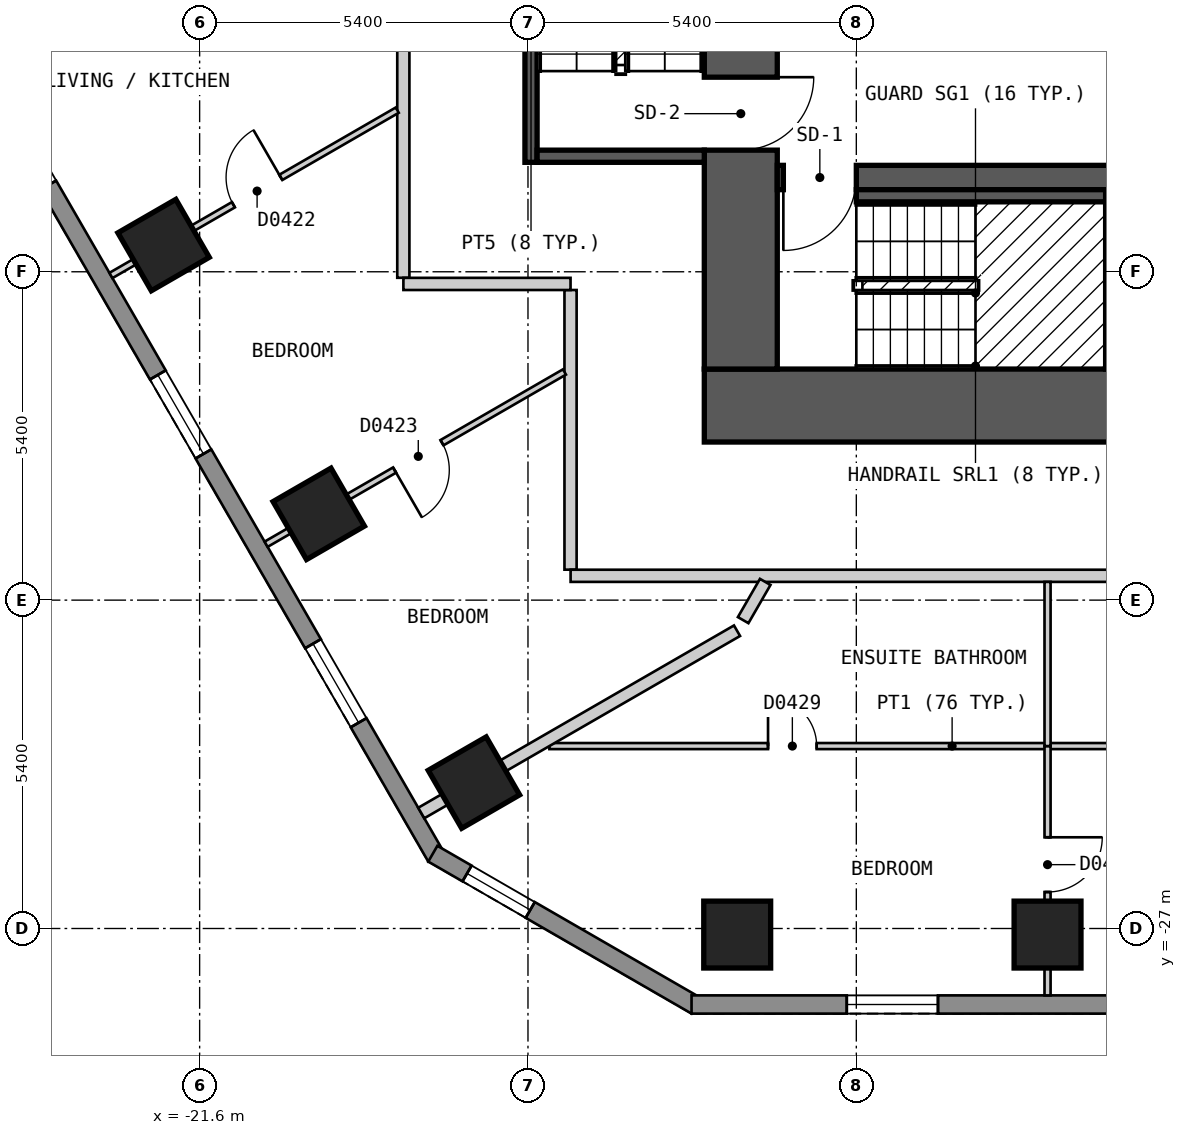
"""IFC4 building model, lengths in metres.
Left out: names, types, materials, properties, quantities, classifications, styles, units other than length and angle.
Written with IfcOpenShell. Run it as: python <this file> out.ifc"""

import sys

from ifc_helpers import new_model, si_unit, direction, frame, frame_2d, origin, origin_2d, place, context, subcontext, project, spatial, polyline, rectangle, outline, extrude, element, fill, save


model = new_model("IFC4")
c1 = context("Model", 3, precision=1e-05, world=origin(), true_north=direction((0.0, 1.0)))
c2 = subcontext(c1, "Body", "Model", "MODEL_VIEW")
j1 = project(units=[si_unit("LENGTHUNIT", "METRE"), si_unit("PLANEANGLEUNIT", "RADIAN")], contexts=[c1])
p1 = place(None, origin())
s1 = spatial("IfcSite", under=j1, at=p1, CompositionType="ELEMENT")
p2 = place(p1, origin())
s2 = spatial("IfcBuilding", under=s1, at=p2, CompositionType="ELEMENT")
p3 = place(p2, frame((0.0, 0.0, 26.4)))
s3 = spatial("IfcBuildingStorey", under=s2, at=p3, CompositionType="ELEMENT", Elevation=26.4)
for number, where, z_axis, x_axis in (
    (1, (-22.193, -15.761, 0.0), (0.0, 0.0, 1.0), (0.5, -0.866, 0.0)),
    (2, (-19.641, -20.181, 0.0), (0.0, 0.0, 1.0), (0.5, -0.866, 0.0)),
    (3, (-17.089, -24.601, 0.0), (0.0, 0.0, 1.0), (0.5, -0.866, 0.0)),
    (4, (-12.759, -27.1, 0.0), (0.0, 0.0, 1.0), (1.0, 0.0, 0.0)),
    (5, (-7.655, -27.1, 0.0), (0.0, 0.0, 1.0), (1.0, 0.0, 0.0)),
):
    element("IfcColumn", number, at=place(p3, frame(where, z_axis=z_axis, x_axis=x_axis)), inside=s3, PredefinedType="COLUMN", context=c2, shape_type="SweptSolid", body=[
        extrude(rectangle(XDim=1.1, YDim=1.1, at=origin_2d()), origin(), (0.0, 0.0, 1.0), 3.0),
    ])
p4 = place(p3, frame((-13.3, -18.4, 0.0), z_axis=(0.0, 0.0, 1.0), x_axis=(1.0, 0.0, 0.0)))
e6 = element("IfcWall", 6, at=p4, inside=s3, PredefinedType="SHEAR", context=c2, shape_type="SweptSolid", body=[
    extrude(rectangle(XDim=26.6, YDim=1.2, at=frame_2d((13.3, 0.0))), origin(), (0.0, 0.0, 1.0), 2.7),
])
p5 = place(p3, frame((-12.7, -17.8, 0.0), z_axis=(0.0, 0.0, 1.0), x_axis=(0.0, 1.0, 0.0)))
e7 = element("IfcWall", 7, at=p5, inside=s3, PredefinedType="SHEAR", context=c2, shape_type="SweptSolid", body=[
    extrude(rectangle(XDim=11.6, YDim=1.2, at=frame_2d((5.8, 0.0))), origin(), (0.0, 0.0, 1.0), 2.7),
])
p6 = place(p5, frame((3.6, 0.0, 0.0)))
e8 = element("IfcOpeningElement", 8, at=p6, cuts=e7, PredefinedType="OPENING", context=c2, shape_type="SweptSolid", body=[
    extrude(rectangle(XDim=1.2, YDim=2.1, at=frame_2d((0.6, 1.05))), frame((0.0, 0.61, 0.0), z_axis=(0.0, -1.0, 0.0), x_axis=(1.0, 0.0, 0.0)), (0.0, 0.0, 1.0), 1.22),
])
p7 = place(p3, frame((-12.1, -14.65, 0.0), z_axis=(0.0, 0.0, 1.0), x_axis=(1.0, 0.0, 0.0)))
e9 = element("IfcWall", 9, at=p7, inside=s3, PredefinedType="SHEAR", context=c2, shape_type="SweptSolid", body=[
    extrude(rectangle(XDim=24.2, YDim=0.4, at=frame_2d((12.1, 0.0))), origin(), (0.0, 0.0, 1.0), 2.7),
])
p8 = place(p7, frame((1.3, 0.0, 0.0), z_axis=(0.0, 0.0, 1.0), x_axis=(-1.0, 0.0, 0.0)))
e10 = element("IfcOpeningElement", 10, at=p8, cuts=e9, PredefinedType="OPENING", context=c2, shape_type="SweptSolid", body=[
    extrude(rectangle(XDim=1.2, YDim=2.1, at=frame_2d((0.6, 1.05))), frame((0.0, 0.21, 0.0), z_axis=(0.0, -1.0, 0.0), x_axis=(1.0, 0.0, 0.0)), (0.0, 0.0, 1.0), 0.42),
])
p9 = place(p7, frame((24.15, 0.0, 0.0), z_axis=(0.0, 0.0, 1.0), x_axis=(-1.0, 0.0, 0.0)))
e11 = element("IfcOpeningElement", 11, at=p9, cuts=e9, PredefinedType="OPENING", context=c2, shape_type="SweptSolid", body=[
    extrude(rectangle(XDim=1.2, YDim=2.1, at=frame_2d((0.6, 1.05))), frame((0.0, 0.21, 0.0), z_axis=(0.0, -1.0, 0.0), x_axis=(1.0, 0.0, 0.0)), (0.0, 0.0, 1.0), 0.42),
])
p10 = place(p7, frame((16.25, 0.0, 0.0), z_axis=(0.0, 0.0, 1.0), x_axis=(-1.0, 0.0, 0.0)))
e12 = element("IfcOpeningElement", 12, at=p10, cuts=e9, PredefinedType="OPENING", context=c2, shape_type="SweptSolid", body=[
    extrude(rectangle(XDim=0.9, YDim=2.1, at=frame_2d((0.45, 1.05))), frame((0.0, 0.21, 0.0), z_axis=(0.0, -1.0, 0.0), x_axis=(1.0, 0.0, 0.0)), (0.0, 0.0, 1.0), 0.42),
])
p11 = place(p7, frame((18.05, 0.0, 0.0), z_axis=(0.0, 0.0, 1.0), x_axis=(-1.0, 0.0, 0.0)))
e13 = element("IfcOpeningElement", 13, at=p11, cuts=e9, PredefinedType="OPENING", context=c2, shape_type="SweptSolid", body=[
    extrude(rectangle(XDim=0.9, YDim=2.1, at=frame_2d((0.45, 1.05))), frame((0.0, 0.21, 0.0), z_axis=(0.0, -1.0, 0.0), x_axis=(1.0, 0.0, 0.0)), (0.0, 0.0, 1.0), 0.42),
])
p12 = place(p3, frame((-31.22, -2.425, 0.0), z_axis=(0.0, 0.0, 1.0), x_axis=(0.500001938803, -0.866024284413, 0.0)))
e14 = element("IfcWall", 14, at=p12, inside=s3, PredefinedType="SOLIDWALL", context=c2, shape_type="SweptSolid", body=[
    extrude(outline(polyline([(0.0, -0.15), (27.02, -0.15), (26.94, 0.15), (0.08, 0.15), (0.0, -0.15)])), origin(), (0.0, 0.0, 1.0), 2.7),
])
p13 = place(p12, frame((2.553, 0.0, 0.15)))
e15 = element("IfcOpeningElement", 15, at=p13, cuts=e14, PredefinedType="OPENING", context=c2, shape_type="SweptSolid", body=[
    extrude(rectangle(XDim=1.5, YDim=2.1, at=frame_2d((0.75, 1.05))), frame((0.0, 0.16, 0.0), z_axis=(0.0, -1.0, 0.0), x_axis=(1.0, 0.0, 0.0)), (0.0, 0.0, 1.0), 0.32),
])
p14 = place(p12, frame((7.657, 0.0, 0.15)))
e16 = element("IfcOpeningElement", 16, at=p14, cuts=e14, PredefinedType="OPENING", context=c2, shape_type="SweptSolid", body=[
    extrude(rectangle(XDim=1.5, YDim=2.1, at=frame_2d((0.75, 1.05))), frame((0.0, 0.16, 0.0), z_axis=(0.0, -1.0, 0.0), x_axis=(1.0, 0.0, 0.0)), (0.0, 0.0, 1.0), 0.32),
])
p15 = place(p12, frame((12.761, 0.0, 0.15)))
e17 = element("IfcOpeningElement", 17, at=p15, cuts=e14, PredefinedType="OPENING", context=c2, shape_type="SweptSolid", body=[
    extrude(rectangle(XDim=1.5, YDim=2.1, at=frame_2d((0.75, 1.05))), frame((0.0, 0.16, 0.0), z_axis=(0.0, -1.0, 0.0), x_axis=(1.0, 0.0, 0.0)), (0.0, 0.0, 1.0), 0.32),
])
p16 = place(p12, frame((17.865, 0.0, 0.15)))
e18 = element("IfcOpeningElement", 18, at=p16, cuts=e14, PredefinedType="OPENING", context=c2, shape_type="SweptSolid", body=[
    extrude(rectangle(XDim=1.5, YDim=2.1, at=frame_2d((0.75, 1.05))), frame((0.0, 0.16, 0.0), z_axis=(0.0, -1.0, 0.0), x_axis=(1.0, 0.0, 0.0)), (0.0, 0.0, 1.0), 0.32),
])
p17 = place(p12, frame((22.969, 0.0, 0.15)))
e19 = element("IfcOpeningElement", 19, at=p17, cuts=e14, PredefinedType="OPENING", context=c2, shape_type="SweptSolid", body=[
    extrude(rectangle(XDim=1.5, YDim=2.1, at=frame_2d((0.75, 1.05))), frame((0.0, 0.16, 0.0), z_axis=(0.0, -1.0, 0.0), x_axis=(1.0, 0.0, 0.0)), (0.0, 0.0, 1.0), 0.32),
])
p18 = place(p3, frame((-17.765, -25.77, 0.0), z_axis=(0.0, 0.0, 1.0), x_axis=(0.866010750942, -0.50002537861, 0.0)))
e20 = element("IfcWall", 20, at=p18, inside=s3, PredefinedType="SOLIDWALL", context=c2, shape_type="SweptSolid", body=[
    extrude(outline(polyline([(0.0, -0.15), (5.0, -0.15), (4.919, 0.15), (0.08, 0.15), (0.0, -0.15)])), origin(), (0.0, 0.0, 1.0), 2.7),
])
p19 = place(p18, frame((0.65, 0.0, 0.15)))
e21 = element("IfcOpeningElement", 21, at=p19, cuts=e20, PredefinedType="OPENING", context=c2, shape_type="SweptSolid", body=[
    extrude(rectangle(XDim=1.2, YDim=2.1, at=frame_2d((0.6, 1.05))), frame((0.0, 0.16, 0.0), z_axis=(0.0, -1.0, 0.0), x_axis=(1.0, 0.0, 0.0)), (0.0, 0.0, 1.0), 0.32),
])
p20 = place(p3, frame((-13.51, -28.25, 0.0), z_axis=(0.0, 0.0, 1.0), x_axis=(1.0, 0.0, 0.0)))
e22 = element("IfcWall", 22, at=p20, inside=s3, PredefinedType="SOLIDWALL", context=c2, shape_type="SweptSolid", body=[
    extrude(outline(polyline([(0.0, -0.15), (27.02, -0.15), (26.94, 0.15), (0.08, 0.15), (0.0, -0.15)])), origin(), (0.0, 0.0, 1.0), 2.7),
])
p21 = place(p20, frame((2.553, 0.0, 0.15)))
e23 = element("IfcOpeningElement", 23, at=p21, cuts=e22, PredefinedType="OPENING", context=c2, shape_type="SweptSolid", body=[
    extrude(rectangle(XDim=1.5, YDim=2.1, at=frame_2d((0.75, 1.05))), frame((0.0, 0.16, 0.0), z_axis=(0.0, -1.0, 0.0), x_axis=(1.0, 0.0, 0.0)), (0.0, 0.0, 1.0), 0.32),
])
p22 = place(p20, frame((7.657, 0.0, 0.15)))
e24 = element("IfcOpeningElement", 24, at=p22, cuts=e22, PredefinedType="OPENING", context=c2, shape_type="SweptSolid", body=[
    extrude(rectangle(XDim=1.5, YDim=2.1, at=frame_2d((0.75, 1.05))), frame((0.0, 0.16, 0.0), z_axis=(0.0, -1.0, 0.0), x_axis=(1.0, 0.0, 0.0)), (0.0, 0.0, 1.0), 0.32),
])
p23 = place(p20, frame((12.761, 0.0, 0.15)))
e25 = element("IfcOpeningElement", 25, at=p23, cuts=e22, PredefinedType="OPENING", context=c2, shape_type="SweptSolid", body=[
    extrude(rectangle(XDim=1.5, YDim=2.1, at=frame_2d((0.75, 1.05))), frame((0.0, 0.16, 0.0), z_axis=(0.0, -1.0, 0.0), x_axis=(1.0, 0.0, 0.0)), (0.0, 0.0, 1.0), 0.32),
])
p24 = place(p20, frame((17.865, 0.0, 0.15)))
e26 = element("IfcOpeningElement", 26, at=p24, cuts=e22, PredefinedType="OPENING", context=c2, shape_type="SweptSolid", body=[
    extrude(rectangle(XDim=1.5, YDim=2.1, at=frame_2d((0.75, 1.05))), frame((0.0, 0.16, 0.0), z_axis=(0.0, -1.0, 0.0), x_axis=(1.0, 0.0, 0.0)), (0.0, 0.0, 1.0), 0.32),
])
p25 = place(p20, frame((22.969, 0.0, 0.15)))
e27 = element("IfcOpeningElement", 27, at=p25, cuts=e22, PredefinedType="OPENING", context=c2, shape_type="SweptSolid", body=[
    extrude(rectangle(XDim=1.5, YDim=2.1, at=frame_2d((0.75, 1.05))), frame((0.0, 0.16, 0.0), z_axis=(0.0, -1.0, 0.0), x_axis=(1.0, 0.0, 0.0)), (0.0, 0.0, 1.0), 0.32),
])
p26 = place(p3, frame((-15.5, -16.5, 0.0), z_axis=(0.0, 0.0, 1.0), x_axis=(0.0, -1.0, 0.0)))
e28 = element("IfcWall", 28, at=p26, inside=s3, PredefinedType="PARTITIONING", context=c2, shape_type="SweptSolid", body=[
    extrude(rectangle(XDim=4.599, YDim=0.2, at=frame_2d((2.3, 0.0))), origin(), (0.0, 0.0, 1.0), 2.7),
])
p27 = place(p3, frame((-18.25, -11.507, 0.0), z_axis=(0.0, 0.0, 1.0), x_axis=(0.0, -1.0, 0.0)))
e29 = element("IfcWall", 29, at=p27, inside=s3, PredefinedType="PARTITIONING", context=c2, shape_type="SweptSolid", body=[
    extrude(rectangle(XDim=4.792, YDim=0.2, at=frame_2d((2.396, 0.0))), origin(), (0.0, 0.0, 1.0), 2.7),
])
p28 = place(p3, frame((-18.249, -16.4, 0.0), z_axis=(0.0, 0.0, 1.0), x_axis=(1.0, 0.0, 0.0)))
e30 = element("IfcWall", 30, at=p28, inside=s3, PredefinedType="PARTITIONING", context=c2, shape_type="SweptSolid", body=[
    extrude(rectangle(XDim=2.749, YDim=0.2, at=frame_2d((1.375, 0.0))), origin(), (0.0, 0.0, 1.0), 2.7),
])
p29 = place(p3, frame((-15.499, -21.2, 0.0), z_axis=(0.0, 0.0, 1.0), x_axis=(1.0, 0.0, 0.0)))
e31 = element("IfcWall", 31, at=p29, inside=s3, PredefinedType="PARTITIONING", context=c2, shape_type="SweptSolid", body=[
    extrude(rectangle(XDim=30.898, YDim=0.2, at=frame_2d((15.449, 0.0))), origin(), (0.0, 0.0, 1.0), 2.7),
])
p30 = place(p29, frame((15.0, 0.0, 0.0)))
e32 = element("IfcOpeningElement", 32, at=p30, cuts=e31, PredefinedType="OPENING", context=c2, shape_type="SweptSolid", body=[
    extrude(rectangle(XDim=1.0, YDim=2.1, at=frame_2d((0.5, 1.05))), frame((0.0, 0.11, 0.0), z_axis=(0.0, -1.0, 0.0), x_axis=(1.0, 0.0, 0.0)), (0.0, 0.0, 1.0), 0.22),
])
p31 = place(p29, frame((20.104, 0.0, 0.0)))
e33 = element("IfcOpeningElement", 33, at=p31, cuts=e31, PredefinedType="OPENING", context=c2, shape_type="SweptSolid", body=[
    extrude(rectangle(XDim=1.0, YDim=2.1, at=frame_2d((0.5, 1.05))), frame((0.0, 0.11, 0.0), z_axis=(0.0, -1.0, 0.0), x_axis=(1.0, 0.0, 0.0)), (0.0, 0.0, 1.0), 0.22),
])
p32 = place(p3, frame((-15.848, -24.0, 0.0), z_axis=(0.0, 0.0, 1.0), x_axis=(1.0, 0.0, 0.0)))
e34 = element("IfcWall", 34, at=p32, inside=s3, PredefinedType="PARTITIONING", context=c2, shape_type="SweptSolid", body=[
    extrude(rectangle(XDim=13.247, YDim=0.1, at=frame_2d((6.624, 0.0))), origin(), (0.0, 0.0, 1.0), 2.7),
])
p33 = place(p32, frame((3.596, 0.0, 0.0)))
e35 = element("IfcOpeningElement", 35, at=p33, cuts=e34, PredefinedType="OPENING", context=c2, shape_type="SweptSolid", body=[
    extrude(rectangle(XDim=0.8, YDim=2.1, at=frame_2d((0.4, 1.05))), frame((0.0, 0.06, 0.0), z_axis=(0.0, -1.0, 0.0), x_axis=(1.0, 0.0, 0.0)), (0.0, 0.0, 1.0), 0.12),
])
p34 = place(p32, frame((10.345, 0.0, 0.0)))
e36 = element("IfcOpeningElement", 36, at=p34, cuts=e34, PredefinedType="OPENING", context=c2, shape_type="SweptSolid", body=[
    extrude(rectangle(XDim=0.8, YDim=2.1, at=frame_2d((0.4, 1.05))), frame((0.0, 0.06, 0.0), z_axis=(0.0, -1.0, 0.0), x_axis=(1.0, 0.0, 0.0)), (0.0, 0.0, 1.0), 0.12),
])
p35 = place(p3, frame((-7.655, -28.1, 0.0), z_axis=(0.0, 0.0, 1.0), x_axis=(0.0, 1.0, 0.0)))
e37 = element("IfcWall", 37, at=p35, inside=s3, PredefinedType="PARTITIONING", context=c2, shape_type="SweptSolid", body=[
    extrude(rectangle(XDim=4.1, YDim=0.1, at=frame_2d((2.05, 0.0))), origin(), (0.0, 0.0, 1.0), 2.7),
])
p36 = place(p35, frame((1.7, 0.0, 0.0)))
e38 = element("IfcOpeningElement", 38, at=p36, cuts=e37, PredefinedType="OPENING", context=c2, shape_type="SweptSolid", body=[
    extrude(rectangle(XDim=0.9, YDim=2.1, at=frame_2d((0.45, 1.05))), frame((0.0, 0.06, 0.0), z_axis=(0.0, -1.0, 0.0), x_axis=(1.0, 0.0, 0.0)), (0.0, 0.0, 1.0), 0.12),
])
p37 = place(p3, frame((-20.507, -20.681, 0.0), z_axis=(0.0, 0.0, 1.0), x_axis=(0.866028446103, 0.499994730513, 0.0)))
e39 = element("IfcWall", 39, at=p37, inside=s3, PredefinedType="PARTITIONING", context=c2, shape_type="SweptSolid", body=[
    extrude(rectangle(XDim=5.666, YDim=0.1, at=frame_2d((2.833, 0.0))), origin(), (0.0, 0.0, 1.0), 2.7),
])
p38 = place(p37, frame((2.44, 0.0, 0.0)))
e40 = element("IfcOpeningElement", 40, at=p38, cuts=e39, PredefinedType="OPENING", context=c2, shape_type="SweptSolid", body=[
    extrude(rectangle(XDim=0.9, YDim=2.1, at=frame_2d((0.45, 1.05))), frame((0.0, 0.06, 0.0), z_axis=(0.0, -1.0, 0.0), x_axis=(1.0, 0.0, 0.0)), (0.0, 0.0, 1.0), 0.12),
])
p39 = place(p3, frame((-23.059, -16.261, 0.0), z_axis=(0.0, 0.0, 1.0), x_axis=(0.866004639177, 0.500035963631, 0.0)))
e41 = element("IfcWall", 41, at=p39, inside=s3, PredefinedType="PARTITIONING", context=c2, shape_type="SweptSolid", body=[
    extrude(rectangle(XDim=5.438, YDim=0.1, at=frame_2d((2.719, 0.0))), origin(), (0.0, 0.0, 1.0), 2.7),
])
p40 = place(p39, frame((2.326, 0.0, 0.0)))
e42 = element("IfcOpeningElement", 42, at=p40, cuts=e41, PredefinedType="OPENING", context=c2, shape_type="SweptSolid", body=[
    extrude(rectangle(XDim=0.9, YDim=2.1, at=frame_2d((0.45, 1.05))), frame((0.0, 0.06, 0.0), z_axis=(0.0, -1.0, 0.0), x_axis=(1.0, 0.0, 0.0)), (0.0, 0.0, 1.0), 0.12),
])
p41 = place(p3, frame((-12.661, -21.929, 0.0), z_axis=(0.0, 0.0, 1.0), x_axis=(0.499683639304, 0.866207977689, 0.0)))
e43 = element("IfcWall", 43, at=p41, inside=s3, PredefinedType="PARTITIONING", context=c2, shape_type="SweptSolid", body=[
    extrude(rectangle(XDim=0.726, YDim=0.2, at=frame_2d((0.363, 0.0))), origin(), (0.0, 0.0, 1.0), 2.7),
])
p42 = place(p3, frame((-17.955, -25.101, 0.0), z_axis=(0.0, 0.0, 1.0), x_axis=(0.866039817231, 0.499975034347, 0.0)))
e44 = element("IfcWall", 44, at=p42, inside=s3, PredefinedType="PARTITIONING", context=c2, shape_type="SweptSolid", body=[
    extrude(rectangle(XDim=5.996, YDim=0.2, at=frame_2d((2.998, 0.0))), origin(), (0.0, 0.0, 1.0), 2.7),
])
p43 = place(p3, frame((-7.655, -24.0, 0.0), z_axis=(0.0, 0.0, 1.0), x_axis=(0.0, 1.0, 0.0)))
e45 = element("IfcWall", 45, at=p43, inside=s3, PredefinedType="PARTITIONING", context=c2, shape_type="SweptSolid", body=[
    extrude(rectangle(XDim=2.7, YDim=0.1, at=frame_2d((1.35, 0.0))), origin(), (0.0, 0.0, 1.0), 2.7),
])
p44 = place(p3, frame((-16.15, -14.4, 0.0), z_axis=(0.0, 0.0, 1.0), x_axis=(0.0, 1.0, 0.0)))
e46 = element("IfcWall", 46, at=p44, inside=s3, PredefinedType="SOLIDWALL", context=c2, shape_type="SweptSolid", body=[
    extrude(rectangle(XDim=5.8, YDim=0.2, at=frame_2d((2.9, 0.0))), origin(), (0.0, 0.0, 1.0), 2.7),
])
p45 = place(p3, frame((-16.05, -14.3, 0.0), z_axis=(0.0, 0.0, 1.0), x_axis=(1.0, 0.0, 0.0)))
e47 = element("IfcWall", 47, at=p45, inside=s3, PredefinedType="SOLIDWALL", context=c2, shape_type="SweptSolid", body=[
    extrude(rectangle(XDim=2.75, YDim=0.2, at=frame_2d((1.375, 0.0))), origin(), (0.0, 0.0, 1.0), 2.7),
])
p46 = place(p3, frame((-10.8, -14.95, 0.0), z_axis=(0.0, 0.0, 1.0), x_axis=(1.0, 0.0, 0.0)))
e48 = element("IfcWall", 48, at=p46, inside=s3, PredefinedType="SOLIDWALL", context=c2, shape_type="SweptSolid", body=[
    extrude(rectangle(XDim=4.1, YDim=0.2, at=frame_2d((2.05, 0.0))), origin(), (0.0, 0.0, 1.0), 2.7),
])
p47 = place(p16, origin())
e49 = element("IfcWindow", 49, at=p47, inside=s3, PartitioningType="SINGLE_PANEL", PredefinedType="WINDOW", context=c2, shape_type="SweptSolid", body=[
    extrude(rectangle(XDim=1.5, YDim=2.1, at=frame_2d((0.75, 1.05))), frame((0.0, 0.03, 0.0), z_axis=(0.0, -1.0, 0.0), x_axis=(1.0, 0.0, 0.0)), (0.0, 0.0, 1.0), 0.06),
])
fill(e18, e49)
p48 = place(p17, origin())
e50 = element("IfcWindow", 50, at=p48, inside=s3, PartitioningType="SINGLE_PANEL", PredefinedType="WINDOW", context=c2, shape_type="SweptSolid", body=[
    extrude(rectangle(XDim=1.5, YDim=2.1, at=frame_2d((0.75, 1.05))), frame((0.0, 0.03, 0.0), z_axis=(0.0, -1.0, 0.0), x_axis=(1.0, 0.0, 0.0)), (0.0, 0.0, 1.0), 0.06),
])
fill(e19, e50)
p49 = place(p19, origin())
e51 = element("IfcWindow", 51, at=p49, inside=s3, PartitioningType="SINGLE_PANEL", PredefinedType="WINDOW", context=c2, shape_type="SweptSolid", body=[
    extrude(rectangle(XDim=1.2, YDim=2.1, at=frame_2d((0.6, 1.05))), frame((0.0, 0.03, 0.0), z_axis=(0.0, -1.0, 0.0), x_axis=(1.0, 0.0, 0.0)), (0.0, 0.0, 1.0), 0.06),
])
fill(e21, e51)
p50 = place(p21, origin())
e52 = element("IfcWindow", 52, at=p50, inside=s3, PartitioningType="SINGLE_PANEL", PredefinedType="WINDOW", context=c2, shape_type="SweptSolid", body=[
    extrude(rectangle(XDim=1.5, YDim=2.1, at=frame_2d((0.75, 1.05))), frame((0.0, 0.03, 0.0), z_axis=(0.0, -1.0, 0.0), x_axis=(1.0, 0.0, 0.0)), (0.0, 0.0, 1.0), 0.06),
])
fill(e23, e52)
p51 = place(p40, origin())
e53 = element("IfcDoor", 53, at=p51, inside=s3, OperationType="SINGLE_SWING_RIGHT", PredefinedType="DOOR", context=c2, shape_type="SweptSolid", body=[
    extrude(rectangle(XDim=0.9, YDim=2.1, at=frame_2d((0.45, 1.05))), frame((0.0, 0.025, 0.0), z_axis=(0.0, -1.0, 0.0), x_axis=(1.0, 0.0, 0.0)), (0.0, 0.0, 1.0), 0.05),
])
fill(e42, e53)
p52 = place(p38, origin())
e54 = element("IfcDoor", 54, at=p52, inside=s3, OperationType="SINGLE_SWING_LEFT", PredefinedType="DOOR", context=c2, shape_type="SweptSolid", body=[
    extrude(rectangle(XDim=0.9, YDim=2.1, at=frame_2d((0.45, 1.05))), frame((0.0, 0.025, 0.0), z_axis=(0.0, -1.0, 0.0), x_axis=(1.0, 0.0, 0.0)), (0.0, 0.0, 1.0), 0.05),
])
fill(e40, e54)
p53 = place(p36, origin())
e55 = element("IfcDoor", 55, at=p53, inside=s3, OperationType="SINGLE_SWING_RIGHT", PredefinedType="DOOR", context=c2, shape_type="SweptSolid", body=[
    extrude(rectangle(XDim=0.9, YDim=2.1, at=frame_2d((0.45, 1.05))), frame((0.0, 0.025, 0.0), z_axis=(0.0, -1.0, 0.0), x_axis=(1.0, 0.0, 0.0)), (0.0, 0.0, 1.0), 0.05),
])
fill(e38, e55)
p54 = place(p33, origin())
e56 = element("IfcDoor", 56, at=p54, inside=s3, OperationType="SINGLE_SWING_LEFT", PredefinedType="DOOR", context=c2, shape_type="SweptSolid", body=[
    extrude(rectangle(XDim=0.8, YDim=2.1, at=frame_2d((0.4, 1.05))), frame((0.0, 0.025, 0.0), z_axis=(0.0, -1.0, 0.0), x_axis=(1.0, 0.0, 0.0)), (0.0, 0.0, 1.0), 0.05),
])
fill(e35, e56)
p55 = place(p8, origin())
e57 = element("IfcDoor", 57, at=p55, inside=s3, OperationType="SINGLE_SWING_RIGHT", PredefinedType="DOOR", context=c2, shape_type="SweptSolid", body=[
    extrude(rectangle(XDim=1.2, YDim=2.1, at=frame_2d((0.6, 1.05))), frame((0.0, 0.025, 0.0), z_axis=(0.0, -1.0, 0.0), x_axis=(1.0, 0.0, 0.0)), (0.0, 0.0, 1.0), 0.05),
])
fill(e10, e57)
p56 = place(p6, origin())
e58 = element("IfcDoor", 58, at=p56, inside=s3, OperationType="SINGLE_SWING_RIGHT", PredefinedType="DOOR", context=c2, shape_type="SweptSolid", body=[
    extrude(rectangle(XDim=1.2, YDim=2.1, at=frame_2d((0.6, 1.05))), frame((0.0, 0.025, 0.0), z_axis=(0.0, -1.0, 0.0), x_axis=(1.0, 0.0, 0.0)), (0.0, 0.0, 1.0), 0.05),
])
fill(e8, e58)
save(model, sys.argv[1])
